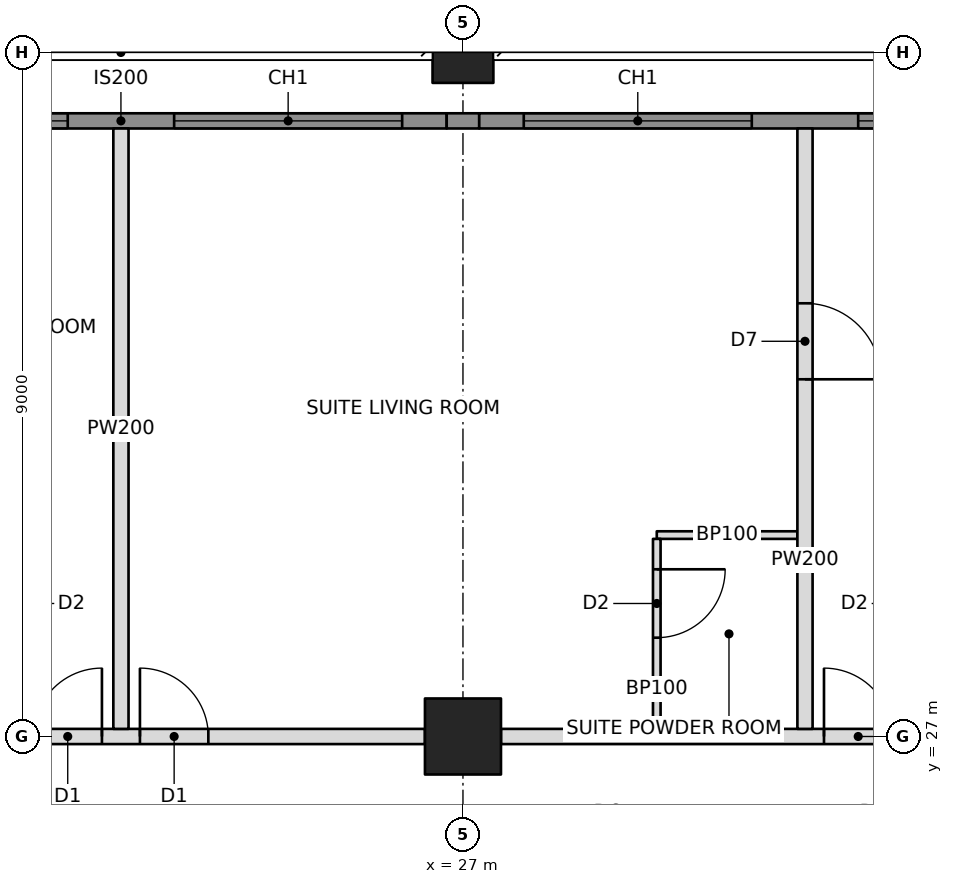
"""IFC4 building model, lengths in metres.
Left out: names, types, materials, properties, quantities, classifications, styles, units other than length and angle.
Written with IfcOpenShell. Run it as: python <this file> out.ifc"""

import sys

from ifc_helpers import new_model, si_unit, direction, frame, frame_2d, origin, origin_2d, place, context, subcontext, project, spatial, rectangle, hollow_rectangle, extrude, element, fill, save


model = new_model("IFC4")
c1 = context("Model", 3, precision=1e-05, world=origin(), true_north=direction((0.0, 1.0)))
c2 = subcontext(c1, "Body", "Model", "MODEL_VIEW")
j1 = project(units=[si_unit("LENGTHUNIT", "METRE"), si_unit("PLANEANGLEUNIT", "RADIAN")], contexts=[c1])
p1 = place(None, origin())
s1 = spatial("IfcSite", under=j1, at=p1, CompositionType="ELEMENT")
p2 = place(p1, origin())
s2 = spatial("IfcBuilding", under=s1, at=p2, CompositionType="ELEMENT")
p3 = place(p2, frame((0.0, 0.0, 152.0)))
s3 = spatial("IfcBuildingStorey", under=s2, at=p3, CompositionType="ELEMENT", Elevation=152.0)
p4 = place(p3, frame((27.0, 27.0, 0.0), z_axis=(0.0, 0.0, 1.0), x_axis=(1.0, 0.0, 0.0)))
e1 = element("IfcColumn", 1, at=p4, inside=s3, PredefinedType="COLUMN", context=c2, shape_type="SweptSolid", body=[
    extrude(hollow_rectangle(XDim=1.0, YDim=1.0, WallThickness=0.1, at=origin_2d()), origin(), (0.0, 0.0, 1.0), 3.4),
])
p5 = place(p3, frame((27.0, 36.0, 0.0), z_axis=(0.0, 0.0, 1.0), x_axis=(1.0, 0.0, 0.0)))
e2 = element("IfcColumn", 2, at=p5, inside=s3, PredefinedType="COLUMN", context=c2, shape_type="SweptSolid", body=[
    extrude(hollow_rectangle(XDim=0.8, YDim=0.8, WallThickness=0.06, at=origin_2d()), origin(), (0.0, 0.0, 1.0), 3.4),
])
p6 = place(p3, frame((18.5, 27.0, 0.0), z_axis=(0.0, 0.0, 1.0), x_axis=(1.0, 0.0, 0.0)))
e3 = element("IfcWall", 3, at=p6, inside=s3, PredefinedType="PARTITIONING", context=c2, shape_type="SweptSolid", body=[
    extrude(rectangle(XDim=8.0, YDim=0.2, at=frame_2d((4.0, 0.0))), origin(), (0.0, 0.0, 1.0), 2.21),
])
p7 = place(p6, frame((2.85, 0.0, 0.0)))
e4 = element("IfcOpeningElement", 4, at=p7, cuts=e3, PredefinedType="OPENING", context=c2, shape_type="SweptSolid", body=[
    extrude(rectangle(XDim=0.9, YDim=2.1, at=frame_2d((0.45, 1.05))), frame((0.0, 0.11, 0.0), z_axis=(0.0, -1.0, 0.0), x_axis=(1.0, 0.0, 0.0)), (0.0, 0.0, 1.0), 0.22),
])
p8 = place(p6, frame((4.25, 0.0, 0.0)))
e5 = element("IfcOpeningElement", 5, at=p8, cuts=e3, PredefinedType="OPENING", context=c2, shape_type="SweptSolid", body=[
    extrude(rectangle(XDim=0.9, YDim=2.1, at=frame_2d((0.45, 1.05))), frame((0.0, 0.11, 0.0), z_axis=(0.0, -1.0, 0.0), x_axis=(1.0, 0.0, 0.0)), (0.0, 0.0, 1.0), 0.22),
])
p9 = place(p3, frame((27.5, 27.0, 0.0), z_axis=(0.0, 0.0, 1.0), x_axis=(1.0, 0.0, 0.0)))
e6 = element("IfcWall", 6, at=p9, inside=s3, PredefinedType="PARTITIONING", context=c2, shape_type="SweptSolid", body=[
    extrude(rectangle(XDim=8.0, YDim=0.2, at=frame_2d((4.0, 0.0))), origin(), (0.0, 0.0, 1.0), 2.21),
])
p10 = place(p9, frame((4.25, 0.0, 0.0)))
e7 = element("IfcOpeningElement", 7, at=p10, cuts=e6, PredefinedType="OPENING", context=c2, shape_type="SweptSolid", body=[
    extrude(rectangle(XDim=0.9, YDim=2.1, at=frame_2d((0.45, 1.05))), frame((0.0, 0.11, 0.0), z_axis=(0.0, -1.0, 0.0), x_axis=(1.0, 0.0, 0.0)), (0.0, 0.0, 1.0), 0.22),
])
p11 = place(p3, frame((22.5, 27.1, 0.0), z_axis=(0.0, 0.0, 1.0), x_axis=(0.0, 1.0, 0.0)))
e8 = element("IfcWall", 8, at=p11, inside=s3, PredefinedType="PARTITIONING", context=c2, shape_type="SweptSolid", body=[
    extrude(rectangle(XDim=7.9, YDim=0.2, at=frame_2d((3.95, 0.0))), origin(), (0.0, 0.0, 1.0), 2.21),
])
p12 = place(p3, frame((31.5, 27.1, 0.0), z_axis=(0.0, 0.0, 1.0), x_axis=(0.0, 1.0, 0.0)))
e9 = element("IfcWall", 9, at=p12, inside=s3, PredefinedType="PARTITIONING", context=c2, shape_type="SweptSolid", body=[
    extrude(rectangle(XDim=7.9, YDim=0.2, at=frame_2d((3.95, 0.0))), origin(), (0.0, 0.0, 1.0), 2.21),
])
p13 = place(p12, frame((4.6, 0.0, 0.0)))
e10 = element("IfcOpeningElement", 10, at=p13, cuts=e9, PredefinedType="OPENING", context=c2, shape_type="SweptSolid", body=[
    extrude(rectangle(XDim=1.0, YDim=2.1, at=frame_2d((0.5, 1.05))), frame((0.0, 0.11, 0.0), z_axis=(0.0, -1.0, 0.0), x_axis=(1.0, 0.0, 0.0)), (0.0, 0.0, 1.0), 0.22),
])
p14 = place(p3, frame((29.55, 29.65, 0.0), z_axis=(0.0, 0.0, 1.0), x_axis=(1.0, 0.0, 0.0)))
e11 = element("IfcWall", 11, at=p14, inside=s3, PredefinedType="PARTITIONING", context=c2, shape_type="SweptSolid", body=[
    extrude(rectangle(XDim=1.85, YDim=0.1, at=frame_2d((0.925, 0.0))), origin(), (0.0, 0.0, 1.0), 3.15),
])
p15 = place(p3, frame((29.55, 27.1, 0.0), z_axis=(0.0, 0.0, 1.0), x_axis=(0.0, 1.0, 0.0)))
e12 = element("IfcWall", 12, at=p15, inside=s3, PredefinedType="PARTITIONING", context=c2, shape_type="SweptSolid", body=[
    extrude(rectangle(XDim=2.5, YDim=0.1, at=frame_2d((1.25, 0.0))), origin(), (0.0, 0.0, 1.0), 2.21),
])
p16 = place(p15, frame((1.2, 0.0, 0.0)))
e13 = element("IfcOpeningElement", 13, at=p16, cuts=e12, PredefinedType="OPENING", context=c2, shape_type="SweptSolid", body=[
    extrude(rectangle(XDim=0.9, YDim=2.1, at=frame_2d((0.45, 1.05))), frame((0.0, 0.06, 0.0), z_axis=(0.0, -1.0, 0.0), x_axis=(1.0, 0.0, 0.0)), (0.0, 0.0, 1.0), 0.12),
])
p17 = place(p3, frame((18.214, 35.1, 0.0), z_axis=(0.0, 0.0, 1.0), x_axis=(1.0, 0.0, 0.0)))
e14 = element("IfcWall", 14, at=p17, inside=s3, PredefinedType="SOLIDWALL", context=c2, shape_type="SweptSolid", body=[
    extrude(rectangle(XDim=8.572, YDim=0.2, at=frame_2d((4.286, 0.0))), origin(), (0.0, 0.0, 1.0), 3.15),
])
p18 = place(p17, frame((0.586, 0.0, 0.6)))
e15 = element("IfcOpeningElement", 15, at=p18, cuts=e14, PredefinedType="OPENING", context=c2, shape_type="SweptSolid", body=[
    extrude(rectangle(XDim=3.0, YDim=2.2, at=frame_2d((1.5, 1.1))), frame((0.0, 0.11, 0.0), z_axis=(0.0, -1.0, 0.0), x_axis=(1.0, 0.0, 0.0)), (0.0, 0.0, 1.0), 0.22),
])
p19 = place(p17, frame((4.986, 0.0, 0.6)))
e16 = element("IfcOpeningElement", 16, at=p19, cuts=e14, PredefinedType="OPENING", context=c2, shape_type="SweptSolid", body=[
    extrude(rectangle(XDim=3.0, YDim=2.2, at=frame_2d((1.5, 1.1))), frame((0.0, 0.11, 0.0), z_axis=(0.0, -1.0, 0.0), x_axis=(1.0, 0.0, 0.0)), (0.0, 0.0, 1.0), 0.22),
])
p20 = place(p3, frame((26.786, 35.1, 0.0), z_axis=(0.0, 0.0, 1.0), x_axis=(1.0, 0.0, 0.0)))
e17 = element("IfcWall", 17, at=p20, inside=s3, PredefinedType="SOLIDWALL", context=c2, shape_type="SweptSolid", body=[
    extrude(rectangle(XDim=0.428, YDim=0.2, at=frame_2d((0.214, 0.0))), origin(), (0.0, 0.0, 1.0), 2.202),
])
p21 = place(p3, frame((27.214, 35.1, 0.0), z_axis=(0.0, 0.0, 1.0), x_axis=(1.0, 0.0, 0.0)))
e18 = element("IfcWall", 18, at=p21, inside=s3, PredefinedType="SOLIDWALL", context=c2, shape_type="SweptSolid", body=[
    extrude(rectangle(XDim=8.571, YDim=0.2, at=frame_2d((4.285, 0.0))), origin(), (0.0, 0.0, 1.0), 3.15),
])
p22 = place(p21, frame((0.586, 0.0, 0.6)))
e19 = element("IfcOpeningElement", 19, at=p22, cuts=e18, PredefinedType="OPENING", context=c2, shape_type="SweptSolid", body=[
    extrude(rectangle(XDim=3.0, YDim=2.2, at=frame_2d((1.5, 1.1))), frame((0.0, 0.11, 0.0), z_axis=(0.0, -1.0, 0.0), x_axis=(1.0, 0.0, 0.0)), (0.0, 0.0, 1.0), 0.22),
])
p23 = place(p21, frame((4.986, 0.0, 0.6)))
e20 = element("IfcOpeningElement", 20, at=p23, cuts=e18, PredefinedType="OPENING", context=c2, shape_type="SweptSolid", body=[
    extrude(rectangle(XDim=3.0, YDim=2.2, at=frame_2d((1.5, 1.1))), frame((0.0, 0.11, 0.0), z_axis=(0.0, -1.0, 0.0), x_axis=(1.0, 0.0, 0.0)), (0.0, 0.0, 1.0), 0.22),
])
p24 = place(p18, origin())
e21 = element("IfcWindow", 21, at=p24, inside=s3, PartitioningType="TRIPLE_PANEL_VERTICAL", PredefinedType="WINDOW", context=c2, shape_type="SweptSolid", body=[
    extrude(rectangle(XDim=3.0, YDim=2.2, at=frame_2d((1.5, 1.1))), frame((0.0, 0.03, 0.0), z_axis=(0.0, -1.0, 0.0), x_axis=(1.0, 0.0, 0.0)), (0.0, 0.0, 1.0), 0.06),
])
fill(e15, e21)
p25 = place(p19, origin())
e22 = element("IfcWindow", 22, at=p25, inside=s3, PartitioningType="TRIPLE_PANEL_VERTICAL", PredefinedType="WINDOW", context=c2, shape_type="SweptSolid", body=[
    extrude(rectangle(XDim=3.0, YDim=2.2, at=frame_2d((1.5, 1.1))), frame((0.0, 0.03, 0.0), z_axis=(0.0, -1.0, 0.0), x_axis=(1.0, 0.0, 0.0)), (0.0, 0.0, 1.0), 0.06),
])
fill(e16, e22)
p26 = place(p22, origin())
e23 = element("IfcWindow", 23, at=p26, inside=s3, PartitioningType="TRIPLE_PANEL_VERTICAL", PredefinedType="WINDOW", context=c2, shape_type="SweptSolid", body=[
    extrude(rectangle(XDim=3.0, YDim=2.2, at=frame_2d((1.5, 1.1))), frame((0.0, 0.03, 0.0), z_axis=(0.0, -1.0, 0.0), x_axis=(1.0, 0.0, 0.0)), (0.0, 0.0, 1.0), 0.06),
])
fill(e19, e23)
p27 = place(p23, origin())
e24 = element("IfcWindow", 24, at=p27, inside=s3, PartitioningType="TRIPLE_PANEL_VERTICAL", PredefinedType="WINDOW", context=c2, shape_type="SweptSolid", body=[
    extrude(rectangle(XDim=3.0, YDim=2.2, at=frame_2d((1.5, 1.1))), frame((0.0, 0.03, 0.0), z_axis=(0.0, -1.0, 0.0), x_axis=(1.0, 0.0, 0.0)), (0.0, 0.0, 1.0), 0.06),
])
fill(e20, e24)
p28 = place(p13, frame((1.0, 0.0, 0.0), z_axis=(0.0, 0.0, 1.0), x_axis=(-1.0, 0.0, 0.0)))
e25 = element("IfcDoor", 25, at=p28, inside=s3, OperationType="SINGLE_SWING_RIGHT", PredefinedType="DOOR", context=c2, shape_type="SweptSolid", body=[
    extrude(rectangle(XDim=1.0, YDim=2.1, at=frame_2d((0.5, 1.05))), frame((0.0, 0.025, 0.0), z_axis=(0.0, -1.0, 0.0), x_axis=(1.0, 0.0, 0.0)), (0.0, 0.0, 1.0), 0.05),
])
fill(e10, e25)
p29 = place(p7, origin())
e26 = element("IfcDoor", 26, at=p29, inside=s3, OperationType="SINGLE_SWING_RIGHT", PredefinedType="DOOR", context=c2, shape_type="SweptSolid", body=[
    extrude(rectangle(XDim=0.9, YDim=2.1, at=frame_2d((0.45, 1.05))), frame((0.0, 0.025, 0.0), z_axis=(0.0, -1.0, 0.0), x_axis=(1.0, 0.0, 0.0)), (0.0, 0.0, 1.0), 0.05),
])
fill(e4, e26)
p30 = place(p16, frame((0.9, 0.0, 0.0), z_axis=(0.0, 0.0, 1.0), x_axis=(-1.0, 0.0, 0.0)))
e27 = element("IfcDoor", 27, at=p30, inside=s3, OperationType="SINGLE_SWING_LEFT", PredefinedType="DOOR", context=c2, shape_type="SweptSolid", body=[
    extrude(rectangle(XDim=0.9, YDim=2.1, at=frame_2d((0.45, 1.05))), frame((0.0, 0.025, 0.0), z_axis=(0.0, -1.0, 0.0), x_axis=(1.0, 0.0, 0.0)), (0.0, 0.0, 1.0), 0.05),
])
fill(e13, e27)
p31 = place(p8, origin())
e28 = element("IfcDoor", 28, at=p31, inside=s3, OperationType="SINGLE_SWING_LEFT", PredefinedType="DOOR", context=c2, shape_type="SweptSolid", body=[
    extrude(rectangle(XDim=0.9, YDim=2.1, at=frame_2d((0.45, 1.05))), frame((0.0, 0.025, 0.0), z_axis=(0.0, -1.0, 0.0), x_axis=(1.0, 0.0, 0.0)), (0.0, 0.0, 1.0), 0.05),
])
fill(e5, e28)
p32 = place(p10, origin())
e29 = element("IfcDoor", 29, at=p32, inside=s3, OperationType="SINGLE_SWING_LEFT", PredefinedType="DOOR", context=c2, shape_type="SweptSolid", body=[
    extrude(rectangle(XDim=0.9, YDim=2.1, at=frame_2d((0.45, 1.05))), frame((0.0, 0.025, 0.0), z_axis=(0.0, -1.0, 0.0), x_axis=(1.0, 0.0, 0.0)), (0.0, 0.0, 1.0), 0.05),
])
fill(e7, e29)
save(model, sys.argv[1])
